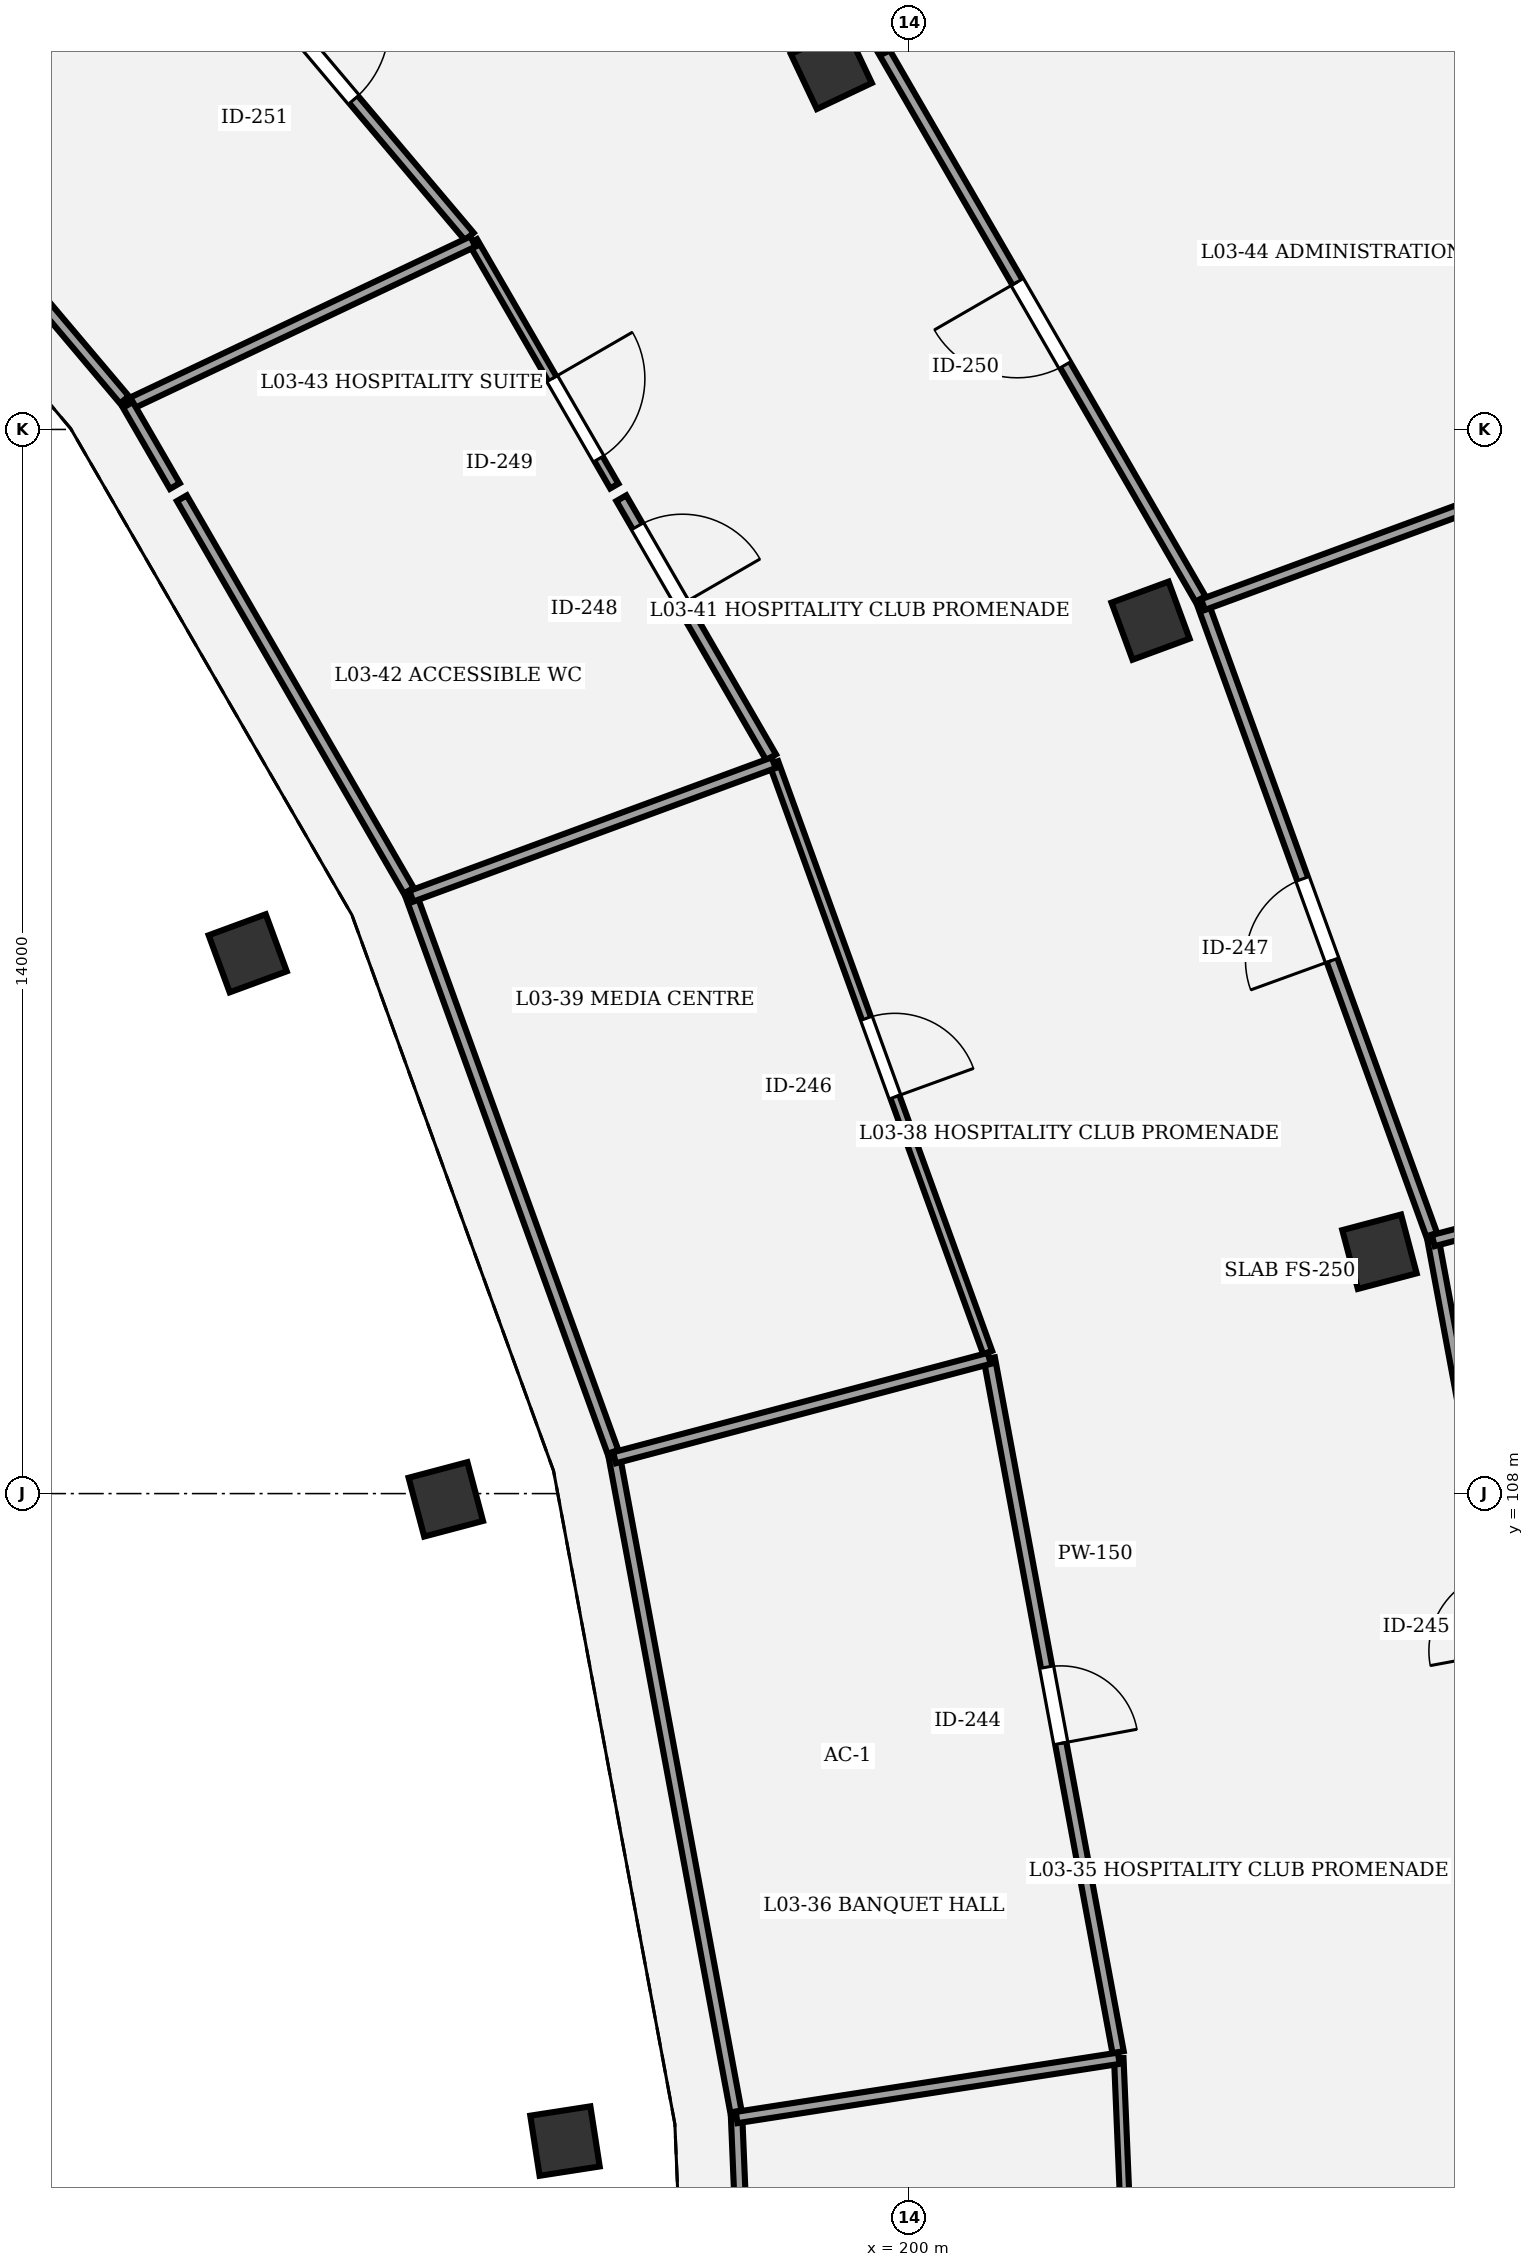
"""IFC4 building model, lengths in metres.
Left out: names, types, materials, properties, quantities, classifications, styles, units other than length and angle.
Written with IfcOpenShell. Run it as: python <this file> out.ifc"""

import sys

from ifc_helpers import new_model, si_unit, direction, frame, frame_2d, origin, origin_2d, place, context, subcontext, project, spatial, rectangle, extrude, element, fill, save


model = new_model("IFC4")
c1 = context("Model", 3, precision=1e-05, world=origin(), true_north=direction((0.0, 1.0)))
c2 = subcontext(c1, "Body", "Model", "MODEL_VIEW")
j1 = project(units=[si_unit("LENGTHUNIT", "METRE"), si_unit("PLANEANGLEUNIT", "RADIAN")], contexts=[c1])
p1 = place(None, origin())
s1 = spatial("IfcSite", under=j1, at=p1, CompositionType="ELEMENT")
p2 = place(p1, origin())
s2 = spatial("IfcBuilding", under=s1, at=p2, CompositionType="ELEMENT")
p3 = place(p2, frame((0.0, 0.0, 14.7)))
s3 = spatial("IfcBuildingStorey", under=s2, at=p3, CompositionType="ELEMENT", Elevation=14.7)
for number, where, z_axis, x_axis in (
    (1, (195.471, 99.482, 0.0), (0.0, 0.0, 1.0), (0.988, 0.153, 0.0)),
    (2, (193.903, 107.924, 0.0), (0.0, 0.0, 1.0), (0.967, 0.256, 0.0)),
):
    element("IfcColumn", number, at=place(p3, frame(where, z_axis=z_axis, x_axis=x_axis)), inside=s3, PredefinedType="COLUMN", context=c2, shape_type="SweptSolid", body=[
        extrude(rectangle(XDim=0.8, YDim=0.8, at=origin_2d()), origin(), (0.0, 0.0, 1.0), 2.85),
    ])
p4 = place(p3, frame((206.188, 111.182, 0.0), z_axis=(0.0, 0.0, 1.0), x_axis=(0.966600102017, 0.256289373133, 0.0)))
e3 = element("IfcColumn", 3, at=p4, inside=s3, PredefinedType="COLUMN", context=c2, shape_type="SweptSolid", body=[
    extrude(rectangle(XDim=0.8, YDim=0.8, at=origin_2d()), origin(), (0.0, 0.0, 1.0), 4.5),
])
p5 = place(p3, frame((191.297, 115.108, 0.0), z_axis=(0.0, 0.0, 1.0), x_axis=(0.938372433776, 0.34562577382, 0.0)))
e4 = element("IfcColumn", 4, at=p5, inside=s3, PredefinedType="COLUMN", context=c2, shape_type="SweptSolid", body=[
    extrude(rectangle(XDim=0.8, YDim=0.8, at=origin_2d()), origin(), (0.0, 0.0, 1.0), 2.85),
])
for number, where, z_axis, x_axis in (
    (5, (203.176, 119.484, 0.0), (0.0, 0.0, 1.0), (0.938, 0.346, 0.0)),
    (6, (198.976, 126.748, 0.0), (0.0, 0.0, 1.0), (0.904, 0.428, 0.0)),
):
    element("IfcColumn", number, at=place(p3, frame(where, z_axis=z_axis, x_axis=x_axis)), inside=s3, PredefinedType="COLUMN", context=c2, shape_type="SweptSolid", body=[
        extrude(rectangle(XDim=0.8, YDim=0.8, at=origin_2d()), origin(), (0.0, 0.0, 1.0), 4.5),
    ])
p6 = place(p3, frame((202.758, 100.571, 0.0), z_axis=(0.0, 0.0, 1.0), x_axis=(0.041894479342, -0.999122040894, 0.0)))
e7 = element("IfcWall", 7, at=p6, inside=s3, PredefinedType="PARTITIONING", context=c2, shape_type="SweptSolid", body=[
    extrude(rectangle(XDim=13.543, YDim=0.125, at=frame_2d((6.771, 0.0))), origin(), (0.0, 0.0, 1.0), 3.25),
])
p7 = place(p6, frame((6.281, 0.0, 0.0)))
e8 = element("IfcOpeningElement", 8, at=p7, cuts=e7, PredefinedType="OPENING", context=c2, shape_type="SweptSolid", body=[
    extrude(rectangle(XDim=0.98, YDim=2.3, at=frame_2d((0.49, 1.15))), frame((0.0, 0.073, 0.0), z_axis=(0.0, -1.0, 0.0), x_axis=(1.0, 0.0, 0.0)), (0.0, 0.0, 1.0), 0.145),
])
p8 = place(p3, frame((201.053, 109.779, 0.0), z_axis=(0.0, 0.0, 1.0), x_axis=(0.182600545941, -0.983187184936, 0.0)))
e9 = element("IfcWall", 9, at=p8, inside=s3, PredefinedType="PARTITIONING", context=c2, shape_type="SweptSolid", body=[
    extrude(rectangle(XDim=9.284, YDim=0.15, at=frame_2d((4.642, 0.0))), origin(), (0.0, 0.0, 1.0), 3.25),
])
p9 = place(p8, frame((4.132, 0.0, 0.0)))
e10 = element("IfcOpeningElement", 10, at=p9, cuts=e9, PredefinedType="OPENING", context=c2, shape_type="SweptSolid", body=[
    extrude(rectangle(XDim=1.02, YDim=2.3, at=frame_2d((0.51, 1.15))), frame((0.0, 0.085, 0.0), z_axis=(0.0, -1.0, 0.0), x_axis=(1.0, 0.0, 0.0)), (0.0, 0.0, 1.0), 0.17),
])
p10 = place(p3, frame((208.707, 101.575, 0.0), z_axis=(0.0, 0.0, 1.0), x_axis=(-0.182618024057, 0.983183938686, 0.0)))
e11 = element("IfcWall", 11, at=p10, inside=s3, PredefinedType="PARTITIONING", context=c2, shape_type="SweptSolid", body=[
    extrude(rectangle(XDim=9.92, YDim=0.15, at=frame_2d((4.96, 0.0))), origin(), (0.0, 0.0, 1.0), 3.25),
])
p11 = place(p10, frame((4.43, 0.0, 0.0)))
e12 = element("IfcOpeningElement", 12, at=p11, cuts=e11, PredefinedType="OPENING", context=c2, shape_type="SweptSolid", body=[
    extrude(rectangle(XDim=1.06, YDim=2.3, at=frame_2d((0.53, 1.15))), frame((0.0, 0.085, 0.0), z_axis=(0.0, -1.0, 0.0), x_axis=(1.0, 0.0, 0.0)), (0.0, 0.0, 1.0), 0.17),
])
p12 = place(p3, frame((198.218, 117.615, 0.0), z_axis=(0.0, 0.0, 1.0), x_axis=(0.341044733968, -0.940047067669, 0.0)))
e13 = element("IfcWall", 13, at=p12, inside=s3, PredefinedType="PARTITIONING", context=c2, shape_type="SweptSolid", body=[
    extrude(rectangle(XDim=8.254, YDim=0.125, at=frame_2d((4.127, 0.0))), origin(), (0.0, 0.0, 1.0), 3.25),
])
p13 = place(p12, frame((3.577, 0.0, 0.0)))
e14 = element("IfcOpeningElement", 14, at=p13, cuts=e13, PredefinedType="OPENING", context=c2, shape_type="SweptSolid", body=[
    extrude(rectangle(XDim=1.1, YDim=2.3, at=frame_2d((0.55, 1.15))), frame((0.0, 0.073, 0.0), z_axis=(0.0, -1.0, 0.0), x_axis=(1.0, 0.0, 0.0)), (0.0, 0.0, 1.0), 0.145),
])
p14 = place(p3, frame((206.874, 111.405, 0.0), z_axis=(0.0, 0.0, 1.0), x_axis=(-0.341031741571, 0.940051781149, 0.0)))
e15 = element("IfcWall", 15, at=p14, inside=s3, PredefinedType="PARTITIONING", context=c2, shape_type="SweptSolid", body=[
    extrude(rectangle(XDim=8.82, YDim=0.15, at=frame_2d((4.41, 0.0))), origin(), (0.0, 0.0, 1.0), 3.25),
])
p15 = place(p14, frame((3.84, 0.0, 0.0)))
e16 = element("IfcOpeningElement", 16, at=p15, cuts=e15, PredefinedType="OPENING", context=c2, shape_type="SweptSolid", body=[
    extrude(rectangle(XDim=1.14, YDim=2.3, at=frame_2d((0.57, 1.15))), frame((0.0, 0.085, 0.0), z_axis=(0.0, -1.0, 0.0), x_axis=(1.0, 0.0, 0.0)), (0.0, 0.0, 1.0), 0.17),
])
p16 = place(p3, frame((196.213, 121.095, 0.0), z_axis=(0.0, 0.0, 1.0), x_axis=(0.500601005137, -0.865678135138, 0.0)))
e17 = element("IfcWall", 17, at=p16, inside=s3, PredefinedType="PARTITIONING", context=c2, shape_type="SweptSolid", body=[
    extrude(rectangle(XDim=3.936, YDim=0.15, at=frame_2d((1.968, 0.0))), origin(), (0.0, 0.0, 1.0), 3.25),
])
p17 = place(p16, frame((0.426, 0.0, 0.0)))
e18 = element("IfcOpeningElement", 18, at=p17, cuts=e17, PredefinedType="OPENING", context=c2, shape_type="SweptSolid", body=[
    extrude(rectangle(XDim=1.18, YDim=2.3, at=frame_2d((0.59, 1.15))), frame((0.0, 0.085, 0.0), z_axis=(0.0, -1.0, 0.0), x_axis=(1.0, 0.0, 0.0)), (0.0, 0.0, 1.0), 0.17),
])
p18 = place(p3, frame((194.26, 124.472, 0.0), z_axis=(0.0, 0.0, 1.0), x_axis=(0.500582967596, -0.865688565566, 0.0)))
e19 = element("IfcWall", 19, at=p18, inside=s3, PredefinedType="PARTITIONING", context=c2, shape_type="SweptSolid", body=[
    extrude(rectangle(XDim=3.716, YDim=0.125, at=frame_2d((1.858, 0.0))), origin(), (0.0, 0.0, 1.0), 3.25),
])
p19 = place(p18, frame((2.083, 0.0, 0.0)))
e20 = element("IfcOpeningElement", 20, at=p19, cuts=e19, PredefinedType="OPENING", context=c2, shape_type="SweptSolid", body=[
    extrude(rectangle(XDim=1.22, YDim=2.3, at=frame_2d((0.61, 1.15))), frame((0.0, 0.073, 0.0), z_axis=(0.0, -1.0, 0.0), x_axis=(1.0, 0.0, 0.0)), (0.0, 0.0, 1.0), 0.145),
])
p20 = place(p3, frame((203.833, 119.769, 0.0), z_axis=(0.0, 0.0, 1.0), x_axis=(-0.500559280672, 0.865702262059, 0.0)))
e21 = element("IfcWall", 21, at=p20, inside=s3, PredefinedType="PARTITIONING", context=c2, shape_type="SweptSolid", body=[
    extrude(rectangle(XDim=8.375, YDim=0.15, at=frame_2d((4.187, 0.0))), origin(), (0.0, 0.0, 1.0), 3.25),
])
p21 = place(p20, frame((3.557, 0.0, 0.0)))
e22 = element("IfcOpeningElement", 22, at=p21, cuts=e21, PredefinedType="OPENING", context=c2, shape_type="SweptSolid", body=[
    extrude(rectangle(XDim=1.26, YDim=2.3, at=frame_2d((0.63, 1.15))), frame((0.0, 0.085, 0.0), z_axis=(0.0, -1.0, 0.0), x_axis=(1.0, 0.0, 0.0)), (0.0, 0.0, 1.0), 0.17),
])
p22 = place(p3, frame((189.193, 130.482, 0.0), z_axis=(0.0, 0.0, 1.0), x_axis=(0.645180817826, -0.764029915847, 0.0)))
e23 = element("IfcWall", 23, at=p22, inside=s3, PredefinedType="PARTITIONING", context=c2, shape_type="SweptSolid", body=[
    extrude(rectangle(XDim=7.779, YDim=0.15, at=frame_2d((3.89, 0.0))), origin(), (0.0, 0.0, 1.0), 3.25),
])
p23 = place(p22, frame((4.103, 0.0, 0.0)))
e24 = element("IfcOpeningElement", 24, at=p23, cuts=e23, PredefinedType="OPENING", context=c2, shape_type="SweptSolid", body=[
    extrude(rectangle(XDim=1.32, YDim=2.3, at=frame_2d((0.66, 1.15))), frame((0.0, 0.085, 0.0), z_axis=(0.0, -1.0, 0.0), x_axis=(1.0, 0.0, 0.0)), (0.0, 0.0, 1.0), 0.17),
])
p24 = place(p3, frame((198.264, 87.04, 0.0), z_axis=(0.0, 0.0, 1.0), x_axis=(-0.04191221065, 0.99912129724, 0.0)))
e25 = element("IfcWall", 25, at=p24, inside=s3, PredefinedType="PARTITIONING", context=c2, shape_type="SweptSolid", body=[
    extrude(rectangle(XDim=12.763, YDim=0.15, at=frame_2d((6.381, 0.0))), origin(), (0.0, 0.0, 1.0), 3.25),
])
p25 = place(p3, frame((197.729, 99.792, 0.0), z_axis=(0.0, 0.0, 1.0), x_axis=(0.988187937952, 0.153246857342, 0.0)))
e26 = element("IfcWall", 26, at=p25, inside=s3, PredefinedType="PARTITIONING", context=c2, shape_type="SweptSolid", body=[
    extrude(rectangle(XDim=5.088, YDim=0.15, at=frame_2d((2.544, 0.0))), origin(), (0.0, 0.0, 1.0), 3.25),
])
p26 = place(p3, frame((197.72, 99.871, 0.0), z_axis=(0.0, 0.0, 1.0), x_axis=(-0.18261493362, 0.983184512703, 0.0)))
e27 = element("IfcWall", 27, at=p26, inside=s3, PredefinedType="PARTITIONING", context=c2, shape_type="SweptSolid", body=[
    extrude(rectangle(XDim=8.747, YDim=0.15, at=frame_2d((4.374, 0.0))), origin(), (0.0, 0.0, 1.0), 3.25),
])
p27 = place(p3, frame((196.123, 108.471, 0.0), z_axis=(0.0, 0.0, 1.0), x_axis=(0.966586731076, 0.256339796576, 0.0)))
e28 = element("IfcWall", 28, at=p27, inside=s3, PredefinedType="PARTITIONING", context=c2, shape_type="SweptSolid", body=[
    extrude(rectangle(XDim=5.101, YDim=0.15, at=frame_2d((2.551, 0.0))), origin(), (0.0, 0.0, 1.0), 3.25),
])
p28 = place(p3, frame((206.895, 111.328, 0.0), z_axis=(0.0, 0.0, 1.0), x_axis=(0.966593450181, 0.25631445934, 0.0)))
e29 = element("IfcWall", 29, at=p28, inside=s3, PredefinedType="PARTITIONING", context=c2, shape_type="SweptSolid", body=[
    extrude(rectangle(XDim=7.936, YDim=0.15, at=frame_2d((3.968, 0.0))), origin(), (0.0, 0.0, 1.0), 3.25),
])
p29 = place(p3, frame((196.102, 108.549, 0.0), z_axis=(0.0, 0.0, 1.0), x_axis=(-0.341049747433, 0.940045248792, 0.0)))
e30 = element("IfcWall", 30, at=p29, inside=s3, PredefinedType="PARTITIONING", context=c2, shape_type="SweptSolid", body=[
    extrude(rectangle(XDim=7.776, YDim=0.15, at=frame_2d((3.888, 0.0))), origin(), (0.0, 0.0, 1.0), 3.25),
])
p30 = place(p3, frame((193.45, 115.859, 0.0), z_axis=(0.0, 0.0, 1.0), x_axis=(0.938341476122, 0.34570981211, 0.0)))
e31 = element("IfcWall", 31, at=p30, inside=s3, PredefinedType="PARTITIONING", context=c2, shape_type="SweptSolid", body=[
    extrude(rectangle(XDim=5.081, YDim=0.15, at=frame_2d((2.541, 0.0))), origin(), (0.0, 0.0, 1.0), 3.25),
])
p31 = place(p3, frame((203.866, 119.696, 0.0), z_axis=(0.0, 0.0, 1.0), x_axis=(0.938346807893, 0.345695340028, 0.0)))
e32 = element("IfcWall", 32, at=p31, inside=s3, PredefinedType="PARTITIONING", context=c2, shape_type="SweptSolid", body=[
    extrude(rectangle(XDim=7.905, YDim=0.15, at=frame_2d((3.952, 0.0))), origin(), (0.0, 0.0, 1.0), 3.25),
])
p32 = place(p3, frame((193.417, 115.932, 0.0), z_axis=(0.0, 0.0, 1.0), x_axis=(-0.500584434262, 0.865687717468, 0.0)))
e33 = element("IfcWall", 33, at=p32, inside=s3, PredefinedType="PARTITIONING", context=c2, shape_type="SweptSolid", body=[
    extrude(rectangle(XDim=5.965, YDim=0.15, at=frame_2d((2.982, 0.0))), origin(), (0.0, 0.0, 1.0), 3.25),
])
p33 = place(p3, frame((189.721, 122.323, 0.0), z_axis=(0.0, 0.0, 1.0), x_axis=(0.903854607543, 0.427839746194, 0.0)))
e34 = element("IfcWall", 34, at=p33, inside=s3, PredefinedType="PARTITIONING", context=c2, shape_type="SweptSolid", body=[
    extrude(rectangle(XDim=5.022, YDim=0.15, at=frame_2d((2.511, 0.0))), origin(), (0.0, 0.0, 1.0), 3.25),
])
p34 = place(p3, frame((190.338, 121.255, 0.0), z_axis=(0.0, 0.0, 1.0), x_axis=(-0.500458917138, 0.865760285678, 0.0)))
e35 = element("IfcWall", 35, at=p34, inside=s3, PredefinedType="PARTITIONING", context=c2, shape_type="SweptSolid", body=[
    extrude(rectangle(XDim=1.234, YDim=0.15, at=frame_2d((0.617, 0.0))), origin(), (0.0, 0.0, 1.0), 3.25),
])
p35 = place(p3, frame((199.641, 127.019, 0.0), z_axis=(0.0, 0.0, 1.0), x_axis=(0.903854859666, 0.427839213559, 0.0)))
e36 = element("IfcWall", 36, at=p35, inside=s3, PredefinedType="PARTITIONING", context=c2, shape_type="SweptSolid", body=[
    extrude(rectangle(XDim=7.814, YDim=0.15, at=frame_2d((3.907, 0.0))), origin(), (0.0, 0.0, 1.0), 3.25),
])
p36 = place(p3, frame((206.704, 130.362, 0.0), z_axis=(0.0, 0.0, 1.0), x_axis=(0.500574107164, -0.865693689036, 0.0)))
e37 = element("IfcWall", 37, at=p36, inside=s3, PredefinedType="PARTITIONING", context=c2, shape_type="SweptSolid", body=[
    extrude(rectangle(XDim=9.08, YDim=0.15, at=frame_2d((4.54, 0.0))), origin(), (0.0, 0.0, 1.0), 3.25),
])
p37 = place(p3, frame((189.675, 122.39, 0.0), z_axis=(0.0, 0.0, 1.0), x_axis=(-0.645177360874, 0.764032835038, 0.0)))
e38 = element("IfcWall", 38, at=p37, inside=s3, PredefinedType="PARTITIONING", context=c2, shape_type="SweptSolid", body=[
    extrude(rectangle(XDim=7.329, YDim=0.15, at=frame_2d((3.665, 0.0))), origin(), (0.0, 0.0, 1.0), 3.25),
])
p38 = place(p9, origin())
e39 = element("IfcDoor", 39, at=p38, inside=s3, OperationType="SINGLE_SWING_RIGHT", PredefinedType="DOOR", context=c2, shape_type="SweptSolid", body=[
    extrude(rectangle(XDim=1.02, YDim=2.3, at=frame_2d((0.51, 1.15))), frame((0.0, 0.025, 0.0), z_axis=(0.0, -1.0, 0.0), x_axis=(1.0, 0.0, 0.0)), (0.0, 0.0, 1.0), 0.05),
])
fill(e10, e39)
p39 = place(p13, origin())
e40 = element("IfcDoor", 40, at=p39, inside=s3, OperationType="SINGLE_SWING_RIGHT", PredefinedType="DOOR", context=c2, shape_type="SweptSolid", body=[
    extrude(rectangle(XDim=1.1, YDim=2.3, at=frame_2d((0.55, 1.15))), frame((0.0, 0.025, 0.0), z_axis=(0.0, -1.0, 0.0), x_axis=(1.0, 0.0, 0.0)), (0.0, 0.0, 1.0), 0.05),
])
fill(e14, e40)
p40 = place(p15, origin())
e41 = element("IfcDoor", 41, at=p40, inside=s3, OperationType="SINGLE_SWING_LEFT", PredefinedType="DOOR", context=c2, shape_type="SweptSolid", body=[
    extrude(rectangle(XDim=1.14, YDim=2.3, at=frame_2d((0.57, 1.15))), frame((0.0, 0.025, 0.0), z_axis=(0.0, -1.0, 0.0), x_axis=(1.0, 0.0, 0.0)), (0.0, 0.0, 1.0), 0.05),
])
fill(e16, e41)
p41 = place(p17, origin())
e42 = element("IfcDoor", 42, at=p41, inside=s3, OperationType="SINGLE_SWING_RIGHT", PredefinedType="DOOR", context=c2, shape_type="SweptSolid", body=[
    extrude(rectangle(XDim=1.18, YDim=2.3, at=frame_2d((0.59, 1.15))), frame((0.0, 0.025, 0.0), z_axis=(0.0, -1.0, 0.0), x_axis=(1.0, 0.0, 0.0)), (0.0, 0.0, 1.0), 0.05),
])
fill(e18, e42)
p42 = place(p19, origin())
e43 = element("IfcDoor", 43, at=p42, inside=s3, OperationType="SINGLE_SWING_LEFT", PredefinedType="DOOR", context=c2, shape_type="SweptSolid", body=[
    extrude(rectangle(XDim=1.22, YDim=2.3, at=frame_2d((0.61, 1.15))), frame((0.0, 0.025, 0.0), z_axis=(0.0, -1.0, 0.0), x_axis=(1.0, 0.0, 0.0)), (0.0, 0.0, 1.0), 0.05),
])
fill(e20, e43)
p43 = place(p21, origin())
e44 = element("IfcDoor", 44, at=p43, inside=s3, OperationType="SINGLE_SWING_RIGHT", PredefinedType="DOOR", context=c2, shape_type="SweptSolid", body=[
    extrude(rectangle(XDim=1.26, YDim=2.3, at=frame_2d((0.63, 1.15))), frame((0.0, 0.025, 0.0), z_axis=(0.0, -1.0, 0.0), x_axis=(1.0, 0.0, 0.0)), (0.0, 0.0, 1.0), 0.05),
])
fill(e22, e44)
p44 = place(p23, origin())
e45 = element("IfcDoor", 45, at=p44, inside=s3, OperationType="SINGLE_SWING_LEFT", PredefinedType="DOOR", context=c2, shape_type="SweptSolid", body=[
    extrude(rectangle(XDim=1.32, YDim=2.3, at=frame_2d((0.66, 1.15))), frame((0.0, 0.025, 0.0), z_axis=(0.0, -1.0, 0.0), x_axis=(1.0, 0.0, 0.0)), (0.0, 0.0, 1.0), 0.05),
])
fill(e24, e45)
save(model, sys.argv[1])
